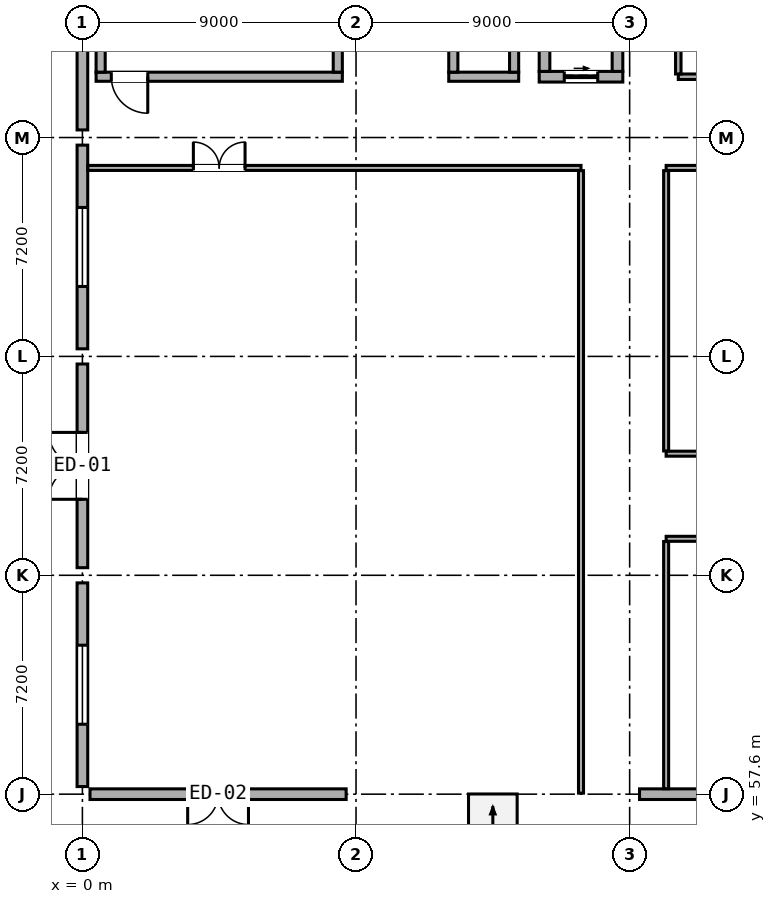
"""IFC4 building model, lengths in metres.
Left out: names, types, materials, properties, quantities, classifications, styles, units other than length and angle.
Written with IfcOpenShell. Run it as: python <this file> out.ifc"""

import sys

from ifc_helpers import new_model, si_unit, direction, frame, frame_2d, origin, origin_2d, place, context, subcontext, project, spatial, rectangle, hollow_rectangle, extrude, element, fill, save


model = new_model("IFC4")
c1 = context("Model", 3, precision=1e-05, world=origin(), true_north=direction((0.0, 1.0)))
c2 = subcontext(c1, "Body", "Model", "MODEL_VIEW")
j1 = project(units=[si_unit("LENGTHUNIT", "METRE"), si_unit("PLANEANGLEUNIT", "RADIAN")], contexts=[c1])
p1 = place(None, origin())
s1 = spatial("IfcSite", under=j1, at=p1, CompositionType="ELEMENT")
p2 = place(p1, origin())
s2 = spatial("IfcBuilding", under=s1, at=p2, CompositionType="ELEMENT")
p3 = place(p2, origin())
s3 = spatial("IfcBuildingStorey", under=s2, at=p3, CompositionType="ELEMENT", Elevation=0.0)
for number, where, z_axis, x_axis in (
    (1, (0.0, 57.6, 0.0), (0.0, 0.0, 1.0), (1.0, 0.0, 0.0)),
    (2, (0.0, 64.8, 0.0), (0.0, 0.0, 1.0), (1.0, 0.0, 0.0)),
    (3, (0.0, 72.0, 0.0), (0.0, 0.0, 1.0), (1.0, 0.0, 0.0)),
    (4, (0.0, 79.2, 0.0), (0.0, 0.0, 1.0), (1.0, 0.0, 0.0)),
):
    element("IfcColumn", number, at=place(p3, frame(where, z_axis=z_axis, x_axis=x_axis)), inside=s3, PredefinedType="COLUMN", context=c2, shape_type="SweptSolid", body=[
        extrude(hollow_rectangle(XDim=0.5, YDim=0.5, WallThickness=0.022, at=origin_2d()), origin(), (0.0, 0.0, 1.0), 4.8),
    ])
for number, where, z_axis, x_axis in (
    (5, (9.0, 57.6, 0.0), (0.0, 0.0, 1.0), (1.0, 0.0, 0.0)),
    (6, (9.0, 64.8, 0.0), (0.0, 0.0, 1.0), (1.0, 0.0, 0.0)),
    (7, (9.0, 72.0, 0.0), (0.0, 0.0, 1.0), (1.0, 0.0, 0.0)),
    (8, (9.0, 79.2, 0.0), (0.0, 0.0, 1.0), (1.0, 0.0, 0.0)),
    (9, (18.0, 57.6, 0.0), (0.0, 0.0, 1.0), (1.0, 0.0, 0.0)),
    (10, (18.0, 64.8, 0.0), (0.0, 0.0, 1.0), (1.0, 0.0, 0.0)),
    (11, (18.0, 72.0, 0.0), (0.0, 0.0, 1.0), (1.0, 0.0, 0.0)),
    (12, (18.0, 79.2, 0.0), (0.0, 0.0, 1.0), (1.0, 0.0, 0.0)),
):
    element("IfcColumn", number, at=place(p3, frame(where, z_axis=z_axis, x_axis=x_axis)), inside=s3, PredefinedType="COLUMN", context=c2, shape_type="SweptSolid", body=[
        extrude(hollow_rectangle(XDim=0.65, YDim=0.65, WallThickness=0.025, at=origin_2d()), origin(), (0.0, 0.0, 1.0), 4.8),
    ])
p4 = place(p3, frame((0.25, 57.6, 0.0), z_axis=(0.0, 0.0, 1.0), x_axis=(1.0, 0.0, 0.0)))
e13 = element("IfcWall", 13, at=p4, inside=s3, PredefinedType="STANDARD", context=c2, shape_type="SweptSolid", body=[
    extrude(rectangle(XDim=8.425, YDim=0.35, at=frame_2d((4.212, 0.0))), origin(), (0.0, 0.0, 1.0), 4.055),
])
p5 = place(p4, frame((3.212, 0.0, 0.0)))
e14 = element("IfcOpeningElement", 14, at=p5, cuts=e13, PredefinedType="OPENING", context=c2, shape_type="SweptSolid", body=[
    extrude(rectangle(XDim=2.0, YDim=2.45, at=frame_2d((1.0, 1.225))), frame((0.0, 0.187, 0.0), z_axis=(0.0, -1.0, 0.0), x_axis=(1.0, 0.0, 0.0)), (0.0, 0.0, 1.0), 0.374),
])
p6 = place(p3, frame((18.325, 57.6, 0.0), z_axis=(0.0, 0.0, 1.0), x_axis=(1.0, 0.0, 0.0)))
e15 = element("IfcWall", 15, at=p6, inside=s3, PredefinedType="STANDARD", context=c2, shape_type="SweptSolid", body=[
    extrude(rectangle(XDim=8.35, YDim=0.35, at=frame_2d((4.175, 0.0))), origin(), (0.0, 0.0, 1.0), 4.055),
])
p7 = place(p6, frame((2.875, 0.0, 0.85)))
e16 = element("IfcOpeningElement", 16, at=p7, cuts=e15, PredefinedType="OPENING", context=c2, shape_type="SweptSolid", body=[
    extrude(rectangle(XDim=2.6, YDim=1.6, at=frame_2d((1.3, 0.8))), frame((0.0, 0.187, 0.0), z_axis=(0.0, -1.0, 0.0), x_axis=(1.0, 0.0, 0.0)), (0.0, 0.0, 1.0), 0.374),
])
p8 = place(p3, frame((0.0, 57.85, 0.0), z_axis=(0.0, 0.0, 1.0), x_axis=(0.0, 1.0, 0.0)))
e17 = element("IfcWall", 17, at=p8, inside=s3, PredefinedType="STANDARD", context=c2, shape_type="SweptSolid", body=[
    extrude(rectangle(XDim=6.7, YDim=0.35, at=frame_2d((3.35, 0.0))), origin(), (0.0, 0.0, 1.0), 4.055),
])
p9 = place(p8, frame((2.05, 0.0, 0.85)))
e18 = element("IfcOpeningElement", 18, at=p9, cuts=e17, PredefinedType="OPENING", context=c2, shape_type="SweptSolid", body=[
    extrude(rectangle(XDim=2.6, YDim=1.6, at=frame_2d((1.3, 0.8))), frame((0.0, 0.187, 0.0), z_axis=(0.0, -1.0, 0.0), x_axis=(1.0, 0.0, 0.0)), (0.0, 0.0, 1.0), 0.374),
])
p10 = place(p3, frame((0.0, 65.05, 0.0), z_axis=(0.0, 0.0, 1.0), x_axis=(0.0, 1.0, 0.0)))
e19 = element("IfcWall", 19, at=p10, inside=s3, PredefinedType="STANDARD", context=c2, shape_type="SweptSolid", body=[
    extrude(rectangle(XDim=6.7, YDim=0.35, at=frame_2d((3.35, 0.0))), origin(), (0.0, 0.0, 1.0), 4.055),
])
p11 = place(p10, frame((2.25, 0.0, 0.0)))
e20 = element("IfcOpeningElement", 20, at=p11, cuts=e19, PredefinedType="OPENING", context=c2, shape_type="SweptSolid", body=[
    extrude(rectangle(XDim=2.2, YDim=2.5, at=frame_2d((1.1, 1.25))), frame((0.0, 0.187, 0.0), z_axis=(0.0, -1.0, 0.0), x_axis=(1.0, 0.0, 0.0)), (0.0, 0.0, 1.0), 0.374),
])
p12 = place(p3, frame((0.0, 72.25, 0.0), z_axis=(0.0, 0.0, 1.0), x_axis=(0.0, 1.0, 0.0)))
e21 = element("IfcWall", 21, at=p12, inside=s3, PredefinedType="STANDARD", context=c2, shape_type="SweptSolid", body=[
    extrude(rectangle(XDim=6.7, YDim=0.35, at=frame_2d((3.35, 0.0))), origin(), (0.0, 0.0, 1.0), 4.055),
])
p13 = place(p12, frame((2.05, 0.0, 0.85)))
e22 = element("IfcOpeningElement", 22, at=p13, cuts=e21, PredefinedType="OPENING", context=c2, shape_type="SweptSolid", body=[
    extrude(rectangle(XDim=2.6, YDim=1.6, at=frame_2d((1.3, 0.8))), frame((0.0, 0.187, 0.0), z_axis=(0.0, -1.0, 0.0), x_axis=(1.0, 0.0, 0.0)), (0.0, 0.0, 1.0), 0.374),
])
p14 = place(p3, frame((0.0, 79.45, 0.0), z_axis=(0.0, 0.0, 1.0), x_axis=(0.0, 1.0, 0.0)))
e23 = element("IfcWall", 23, at=p14, inside=s3, PredefinedType="STANDARD", context=c2, shape_type="SweptSolid", body=[
    extrude(rectangle(XDim=6.7, YDim=0.35, at=frame_2d((3.35, 0.0))), origin(), (0.0, 0.0, 1.0), 4.055),
])
p15 = place(p3, frame((0.45, 81.2, 0.0), z_axis=(0.0, 0.0, 1.0), x_axis=(1.0, 0.0, 0.0)))
e24 = element("IfcWall", 24, at=p15, inside=s3, PredefinedType="SHEAR", context=c2, shape_type="SweptSolid", body=[
    extrude(rectangle(XDim=8.1, YDim=0.3, at=frame_2d((4.05, 0.0))), origin(), (0.0, 0.0, 1.0), 4.555),
])
p16 = place(p15, frame((0.5, 0.0, 0.0)))
e25 = element("IfcOpeningElement", 25, at=p16, cuts=e24, PredefinedType="OPENING", context=c2, shape_type="SweptSolid", body=[
    extrude(rectangle(XDim=1.2, YDim=2.1, at=frame_2d((0.6, 1.05))), frame((0.0, 0.162, 0.0), z_axis=(0.0, -1.0, 0.0), x_axis=(1.0, 0.0, 0.0)), (0.0, 0.0, 1.0), 0.324),
])
for number, where, z_axis, x_axis in (
    (26, (0.6, 81.35, 0.0), (0.0, 0.0, 1.0), (0.0, 1.0, 0.0)),
    (27, (8.4, 81.35, 0.0), (0.0, 0.0, 1.0), (0.0, 1.0, 0.0)),
):
    element("IfcWall", number, at=place(p3, frame(where, z_axis=z_axis, x_axis=x_axis)), inside=s3, PredefinedType="SHEAR", context=c2, shape_type="SweptSolid", body=[
        extrude(rectangle(XDim=3.8, YDim=0.3, at=frame_2d((1.9, 0.0))), origin(), (0.0, 0.0, 1.0), 4.555),
    ])
p17 = place(p3, frame((15.025, 81.2, 0.0), z_axis=(0.0, 0.0, 1.0), x_axis=(1.0, 0.0, 0.0)))
e28 = element("IfcWall", 28, at=p17, inside=s3, PredefinedType="SHEAR", context=c2, shape_type="SweptSolid", body=[
    extrude(rectangle(XDim=2.75, YDim=0.35, at=frame_2d((1.375, 0.0))), origin(), (0.0, 0.0, 1.0), 4.555),
])
p18 = place(p17, frame((0.825, 0.0, 0.0)))
e29 = element("IfcOpeningElement", 29, at=p18, cuts=e28, PredefinedType="OPENING", context=c2, shape_type="SweptSolid", body=[
    extrude(rectangle(XDim=1.1, YDim=2.1, at=frame_2d((0.55, 1.05))), frame((0.0, 0.187, 0.0), z_axis=(0.0, -1.0, 0.0), x_axis=(1.0, 0.0, 0.0)), (0.0, 0.0, 1.0), 0.374),
])
for number, where, z_axis, x_axis in (
    (30, (15.2, 81.375, 0.0), (0.0, 0.0, 1.0), (0.0, 1.0, 0.0)),
    (31, (17.6, 81.375, 0.0), (0.0, 0.0, 1.0), (0.0, 1.0, 0.0)),
):
    element("IfcWall", number, at=place(p3, frame(where, z_axis=z_axis, x_axis=x_axis)), inside=s3, PredefinedType="SHEAR", context=c2, shape_type="SweptSolid", body=[
        extrude(rectangle(XDim=2.25, YDim=0.35, at=frame_2d((1.125, 0.0))), origin(), (0.0, 0.0, 1.0), 4.555),
    ])
p19 = place(p3, frame((12.05, 81.2, 0.0), z_axis=(0.0, 0.0, 1.0), x_axis=(1.0, 0.0, 0.0)))
e32 = element("IfcWall", 32, at=p19, inside=s3, PredefinedType="SHEAR", context=c2, shape_type="SweptSolid", body=[
    extrude(rectangle(XDim=2.3, YDim=0.3, at=frame_2d((1.15, 0.0))), origin(), (0.0, 0.0, 1.0), 4.555),
])
for number, where, z_axis, x_axis in (
    (33, (12.2, 81.35, 0.0), (0.0, 0.0, 1.0), (0.0, 1.0, 0.0)),
    (34, (14.2, 81.35, 0.0), (0.0, 0.0, 1.0), (0.0, 1.0, 0.0)),
):
    element("IfcWall", number, at=place(p3, frame(where, z_axis=z_axis, x_axis=x_axis)), inside=s3, PredefinedType="SHEAR", context=c2, shape_type="SweptSolid", body=[
        extrude(rectangle(XDim=1.9, YDim=0.3, at=frame_2d((0.95, 0.0))), origin(), (0.0, 0.0, 1.0), 4.555),
    ])
p20 = place(p3, frame((19.6, 81.2, 0.0), z_axis=(0.0, 0.0, 1.0), x_axis=(1.0, 0.0, 0.0)))
e35 = element("IfcWall", 35, at=p20, inside=s3, PredefinedType="PARTITIONING", context=c2, shape_type="SweptSolid", body=[
    extrude(rectangle(XDim=7.0, YDim=0.18, at=frame_2d((3.5, 0.0))), origin(), (0.0, 0.0, 1.0), 4.555),
])
p21 = place(p20, frame((3.0, 0.0, 0.0)))
e36 = element("IfcOpeningElement", 36, at=p21, cuts=e35, PredefinedType="OPENING", context=c2, shape_type="SweptSolid", body=[
    extrude(rectangle(XDim=1.0, YDim=2.08, at=frame_2d((0.5, 1.04))), frame((0.0, 0.102, 0.0), z_axis=(0.0, -1.0, 0.0), x_axis=(1.0, 0.0, 0.0)), (0.0, 0.0, 1.0), 0.204),
])
p22 = place(p3, frame((19.6, 81.29, 0.0), z_axis=(0.0, 0.0, 1.0), x_axis=(0.0, 1.0, 0.0)))
e37 = element("IfcWall", 37, at=p22, inside=s3, PredefinedType="PARTITIONING", context=c2, shape_type="SweptSolid", body=[
    extrude(rectangle(XDim=2.22, YDim=0.18, at=frame_2d((1.11, 0.0))), origin(), (0.0, 0.0, 1.0), 4.555),
])
p23 = place(p3, frame((0.18, 78.2, 0.0), z_axis=(0.0, 0.0, 1.0), x_axis=(1.0, 0.0, 0.0)))
e38 = element("IfcWall", 38, at=p23, inside=s3, PredefinedType="PARTITIONING", context=c2, shape_type="SweptSolid", body=[
    extrude(rectangle(XDim=16.22, YDim=0.165, at=frame_2d((8.11, 0.0))), origin(), (0.0, 0.0, 1.0), 4.555),
])
p24 = place(p23, frame((3.47, 0.0, 0.0)))
e39 = element("IfcOpeningElement", 39, at=p24, cuts=e38, PredefinedType="OPENING", context=c2, shape_type="SweptSolid", body=[
    extrude(rectangle(XDim=1.7, YDim=2.12, at=frame_2d((0.85, 1.06))), frame((0.0, 0.094, 0.0), z_axis=(0.0, -1.0, 0.0), x_axis=(1.0, 0.0, 0.0)), (0.0, 0.0, 1.0), 0.189),
])
p25 = place(p3, frame((16.4, 57.635, 0.0), z_axis=(0.0, 0.0, 1.0), x_axis=(0.0, 1.0, 0.0)))
e40 = element("IfcWall", 40, at=p25, inside=s3, PredefinedType="PARTITIONING", context=c2, shape_type="SweptSolid", body=[
    extrude(rectangle(XDim=20.475, YDim=0.165, at=frame_2d((10.238, 0.0))), origin(), (0.0, 0.0, 1.0), 4.555),
])
p26 = place(p3, frame((19.2, 66.0, 0.0), z_axis=(0.0, 0.0, 1.0), x_axis=(1.0, 0.0, 0.0)))
e41 = element("IfcWall", 41, at=p26, inside=s3, PredefinedType="PARTITIONING", context=c2, shape_type="SweptSolid", body=[
    extrude(rectangle(XDim=16.8, YDim=0.165, at=frame_2d((8.4, 0.0))), origin(), (0.0, 0.0, 1.0), 4.555),
])
p27 = place(p26, frame((2.575, 0.0, 0.0)))
e42 = element("IfcOpeningElement", 42, at=p27, cuts=e41, PredefinedType="OPENING", context=c2, shape_type="SweptSolid", body=[
    extrude(rectangle(XDim=1.45, YDim=2.1, at=frame_2d((0.725, 1.05))), frame((0.0, 0.094, 0.0), z_axis=(0.0, -1.0, 0.0), x_axis=(1.0, 0.0, 0.0)), (0.0, 0.0, 1.0), 0.189),
])
p28 = place(p3, frame((19.2, 57.78, 0.0), z_axis=(0.0, 0.0, 1.0), x_axis=(0.0, 1.0, 0.0)))
e43 = element("IfcWall", 43, at=p28, inside=s3, PredefinedType="PARTITIONING", context=c2, shape_type="SweptSolid", body=[
    extrude(rectangle(XDim=8.13, YDim=0.165, at=frame_2d((4.065, 0.0))), origin(), (0.0, 0.0, 1.0), 4.555),
])
p29 = place(p3, frame((19.2, 68.8, 0.0), z_axis=(0.0, 0.0, 1.0), x_axis=(1.0, 0.0, 0.0)))
e44 = element("IfcWall", 44, at=p29, inside=s3, PredefinedType="PARTITIONING", context=c2, shape_type="SweptSolid", body=[
    extrude(rectangle(XDim=16.8, YDim=0.165, at=frame_2d((8.4, 0.0))), origin(), (0.0, 0.0, 1.0), 4.555),
])
p30 = place(p3, frame((19.2, 78.2, 0.0), z_axis=(0.0, 0.0, 1.0), x_axis=(1.0, 0.0, 0.0)))
e45 = element("IfcWall", 45, at=p30, inside=s3, PredefinedType="PARTITIONING", context=c2, shape_type="SweptSolid", body=[
    extrude(rectangle(XDim=16.765, YDim=0.165, at=frame_2d((8.383, 0.0))), origin(), (0.0, 0.0, 1.0), 4.555),
])
p31 = place(p30, frame((2.8, 0.0, 0.0)))
e46 = element("IfcOpeningElement", 46, at=p31, cuts=e45, PredefinedType="OPENING", context=c2, shape_type="SweptSolid", body=[
    extrude(rectangle(XDim=1.0, YDim=2.08, at=frame_2d((0.5, 1.04))), frame((0.0, 0.094, 0.0), z_axis=(0.0, -1.0, 0.0), x_axis=(1.0, 0.0, 0.0)), (0.0, 0.0, 1.0), 0.189),
])
p32 = place(p3, frame((19.2, 68.89, 0.0), z_axis=(0.0, 0.0, 1.0), x_axis=(0.0, 1.0, 0.0)))
e47 = element("IfcWall", 47, at=p32, inside=s3, PredefinedType="PARTITIONING", context=c2, shape_type="SweptSolid", body=[
    extrude(rectangle(XDim=9.22, YDim=0.165, at=frame_2d((4.61, 0.0))), origin(), (0.0, 0.0, 1.0), 4.555),
])
p33 = place(p5, frame((2.0, 0.0, 0.0), z_axis=(0.0, 0.0, 1.0), x_axis=(-1.0, 0.0, 0.0)))
e48 = element("IfcDoor", 48, at=p33, inside=s3, OperationType="DOUBLE_DOOR_SINGLE_SWING", PredefinedType="DOOR", context=c2, shape_type="SweptSolid", body=[
    extrude(rectangle(XDim=2.0, YDim=2.45, at=frame_2d((1.0, 1.225))), frame((0.0, 0.025, 0.0), z_axis=(0.0, -1.0, 0.0), x_axis=(1.0, 0.0, 0.0)), (0.0, 0.0, 1.0), 0.05),
])
fill(e14, e48)
p34 = place(p9, origin())
e49 = element("IfcWindow", 49, at=p34, inside=s3, PartitioningType="DOUBLE_PANEL_VERTICAL", PredefinedType="WINDOW", context=c2, shape_type="SweptSolid", body=[
    extrude(rectangle(XDim=2.6, YDim=1.6, at=frame_2d((1.3, 0.8))), frame((0.0, 0.03, 0.0), z_axis=(0.0, -1.0, 0.0), x_axis=(1.0, 0.0, 0.0)), (0.0, 0.0, 1.0), 0.06),
])
fill(e18, e49)
p35 = place(p11, origin())
e50 = element("IfcDoor", 50, at=p35, inside=s3, OperationType="DOUBLE_DOOR_SINGLE_SWING", PredefinedType="DOOR", context=c2, shape_type="SweptSolid", body=[
    extrude(rectangle(XDim=2.2, YDim=2.5, at=frame_2d((1.1, 1.25))), frame((0.0, 0.025, 0.0), z_axis=(0.0, -1.0, 0.0), x_axis=(1.0, 0.0, 0.0)), (0.0, 0.0, 1.0), 0.05),
])
fill(e20, e50)
p36 = place(p13, origin())
e51 = element("IfcWindow", 51, at=p36, inside=s3, PartitioningType="DOUBLE_PANEL_VERTICAL", PredefinedType="WINDOW", context=c2, shape_type="SweptSolid", body=[
    extrude(rectangle(XDim=2.6, YDim=1.6, at=frame_2d((1.3, 0.8))), frame((0.0, 0.03, 0.0), z_axis=(0.0, -1.0, 0.0), x_axis=(1.0, 0.0, 0.0)), (0.0, 0.0, 1.0), 0.06),
])
fill(e22, e51)
p37 = place(p16, frame((1.2, 0.0, 0.0), z_axis=(0.0, 0.0, 1.0), x_axis=(-1.0, 0.0, 0.0)))
e52 = element("IfcDoor", 52, at=p37, inside=s3, OperationType="SINGLE_SWING_LEFT", PredefinedType="DOOR", context=c2, shape_type="SweptSolid", body=[
    extrude(rectangle(XDim=1.2, YDim=2.1, at=frame_2d((0.6, 1.05))), frame((0.0, 0.025, 0.0), z_axis=(0.0, -1.0, 0.0), x_axis=(1.0, 0.0, 0.0)), (0.0, 0.0, 1.0), 0.05),
])
fill(e25, e52)
p38 = place(p18, origin())
e53 = element("IfcDoor", 53, at=p38, inside=s3, OperationType="SLIDING_TO_LEFT", PredefinedType="DOOR", context=c2, shape_type="SweptSolid", body=[
    extrude(rectangle(XDim=1.1, YDim=2.1, at=frame_2d((0.55, 1.05))), frame((0.0, 0.025, 0.0), z_axis=(0.0, -1.0, 0.0), x_axis=(1.0, 0.0, 0.0)), (0.0, 0.0, 1.0), 0.05),
])
fill(e29, e53)
p39 = place(p24, origin())
e54 = element("IfcDoor", 54, at=p39, inside=s3, OperationType="DOUBLE_DOOR_SINGLE_SWING", PredefinedType="DOOR", context=c2, shape_type="SweptSolid", body=[
    extrude(rectangle(XDim=1.7, YDim=2.12, at=frame_2d((0.85, 1.06))), frame((0.0, 0.025, 0.0), z_axis=(0.0, -1.0, 0.0), x_axis=(1.0, 0.0, 0.0)), (0.0, 0.0, 1.0), 0.05),
])
fill(e39, e54)
save(model, sys.argv[1])
